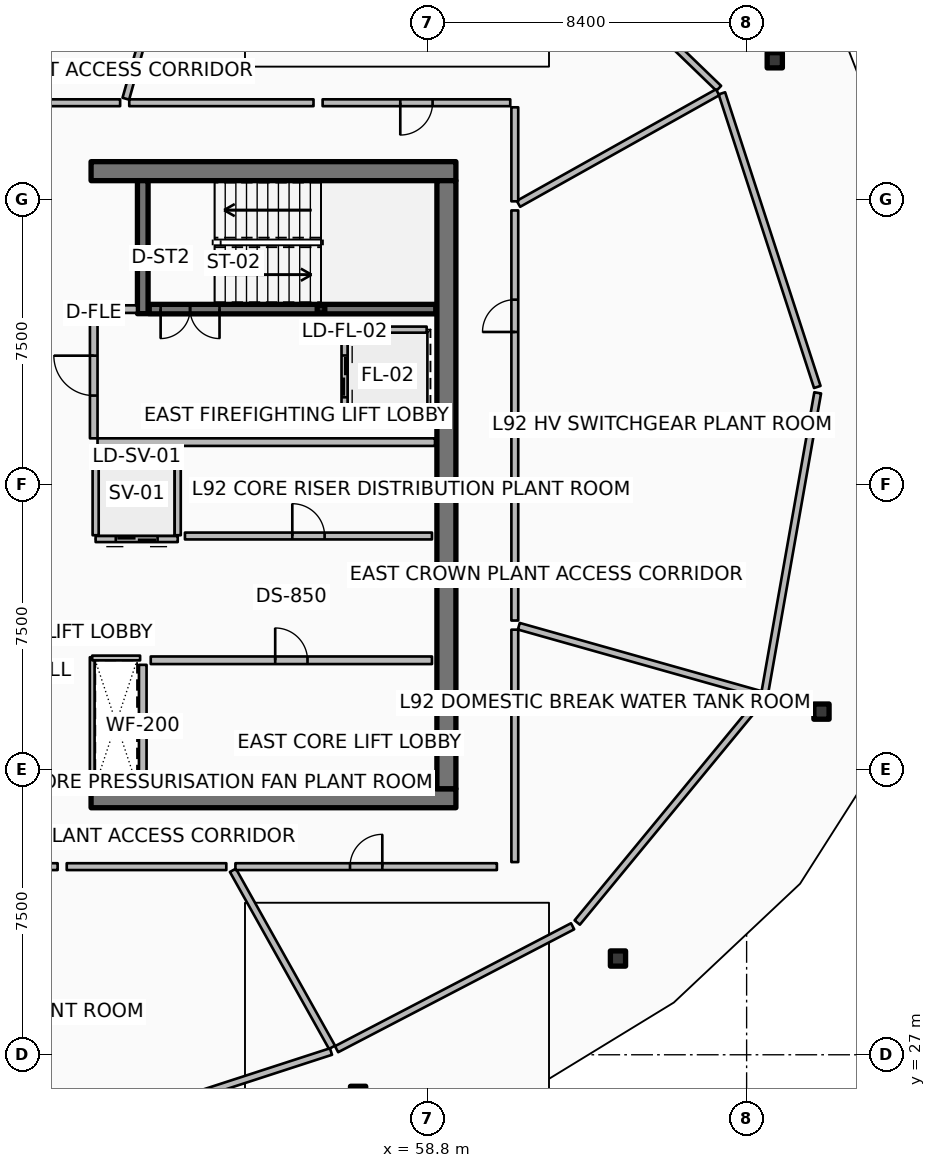
"""IFC4 building model, lengths in metres.
Left out: names, types, materials, properties, quantities, classifications, styles, units other than length and angle.
Written with IfcOpenShell. Run it as: python <this file> out.ifc"""

import sys

from ifc_helpers import new_model, si_unit, direction, frame, frame_2d, origin, origin_2d, place, context, subcontext, project, spatial, rectangle, hollow_rectangle, extrude, element, fill, save


model = new_model("IFC4")
c1 = context("Model", 3, precision=1e-05, world=origin(), true_north=direction((0.0, 1.0)))
c2 = subcontext(c1, "Body", "Model", "MODEL_VIEW")
j1 = project(units=[si_unit("LENGTHUNIT", "METRE"), si_unit("PLANEANGLEUNIT", "RADIAN")], contexts=[c1])
p1 = place(None, origin())
s1 = spatial("IfcSite", under=j1, at=p1, CompositionType="ELEMENT")
p2 = place(p1, origin())
s2 = spatial("IfcBuilding", under=s1, at=p2, CompositionType="ELEMENT")
p3 = place(p2, frame((0.0, 0.0, 366.8)))
s3 = spatial("IfcBuildingStorey", under=s2, at=p3, CompositionType="ELEMENT", Elevation=366.8)
for number, where, z_axis, x_axis in (
    (1, (49.95, 33.75, 0.0), (0.0, 0.0, 1.0), (1.0, 0.0, 0.0)),
    (2, (49.95, 50.25, 0.0), (0.0, 0.0, 1.0), (1.0, 0.0, 0.0)),
):
    element("IfcWall", number, at=place(p3, frame(where, z_axis=z_axis, x_axis=x_axis)), inside=s3, PredefinedType="SHEAR", context=c2, shape_type="SweptSolid", body=[
        extrude(rectangle(XDim=9.6, YDim=0.5, at=frame_2d((4.8, 0.0))), origin(), (0.0, 0.0, 1.0), 3.6),
    ])
p4 = place(p3, frame((59.3, 34.0, 0.0), z_axis=(0.0, 0.0, 1.0), x_axis=(0.0, 1.0, 0.0)))
e3 = element("IfcWall", 3, at=p4, inside=s3, PredefinedType="SHEAR", context=c2, shape_type="SweptSolid", body=[
    extrude(rectangle(XDim=16.0, YDim=0.5, at=frame_2d((8.0, 0.0))), origin(), (0.0, 0.0, 1.0), 3.6),
])
p5 = place(p3, frame((51.31, 46.5, 0.0), z_axis=(0.0, 0.0, 1.0), x_axis=(0.0, 1.0, 0.0)))
e4 = element("IfcWall", 4, at=p5, inside=s3, PredefinedType="SHEAR", context=c2, shape_type="SweptSolid", body=[
    extrude(rectangle(XDim=3.5, YDim=0.28, at=frame_2d((1.75, 0.0))), origin(), (0.0, 0.0, 1.0), 3.6),
])
p6 = place(p3, frame((56.0, 46.62, 0.0), z_axis=(0.0, 0.0, 1.0), x_axis=(1.0, 0.0, 0.0)))
e5 = element("IfcColumn", 5, at=p6, inside=s3, PredefinedType="COLUMN", context=c2, shape_type="SweptSolid", body=[
    extrude(hollow_rectangle(XDim=0.2, YDim=0.2, WallThickness=0.01, InnerFilletRadius=0.01, OuterFilletRadius=0.02, at=origin_2d()), origin(), (0.0, 0.0, 1.0), 1.595),
])
for number, where, z_axis, x_axis in (
    (6, (67.941, 53.167, 0.0), (0.0, 0.0, 1.0), (1.0, 0.0, 0.0)),
    (7, (56.977, 25.971, 0.0), (0.0, 0.0, 1.0), (1.0, 0.0, 0.0)),
    (8, (63.815, 29.532, 0.0), (0.0, 0.0, 1.0), (1.0, 0.0, 0.0)),
    (9, (69.17, 36.03, 0.0), (0.0, 0.0, 1.0), (1.0, 0.0, 0.0)),
):
    element("IfcColumn", number, at=place(p3, frame(where, z_axis=z_axis, x_axis=x_axis)), inside=s3, PredefinedType="COLUMN", context=c2, shape_type="SweptSolid", body=[
        extrude(hollow_rectangle(XDim=0.4, YDim=0.4, WallThickness=0.02, InnerFilletRadius=0.02, OuterFilletRadius=0.04, at=origin_2d()), origin(), (0.0, 0.0, 1.0), 3.32),
    ])
p7 = place(p3, frame((51.48, 46.62, 0.0), z_axis=(0.0, 0.0, 1.0), x_axis=(1.0, 0.0, 0.0)))
e10 = element("IfcWall", 10, at=p7, inside=s3, PredefinedType="SOLIDWALL", context=c2, shape_type="SweptSolid", body=[
    extrude(rectangle(XDim=7.54, YDim=0.25, at=frame_2d((3.77, 0.0))), origin(), (0.0, 0.0, 1.0), 3.32),
])
p8 = place(p7, frame((0.3, 0.0, 0.0)))
e11 = element("IfcOpeningElement", 11, at=p8, cuts=e10, PredefinedType="OPENING", context=c2, shape_type="SweptSolid", body=[
    extrude(rectangle(XDim=1.55, YDim=2.15, at=frame_2d((0.775, 1.075))), frame((0.0, 0.135, 0.0), z_axis=(0.0, -1.0, 0.0), x_axis=(1.0, 0.0, 0.0)), (0.0, 0.0, 1.0), 0.27),
])
p9 = place(p3, frame((51.52, 37.38, 0.0), z_axis=(0.0, 0.0, 1.0), x_axis=(1.0, 0.0, 0.0)))
e12 = element("IfcWall", 12, at=p9, inside=s3, PredefinedType="PARTITIONING", context=c2, shape_type="SweptSolid", body=[
    extrude(rectangle(XDim=7.4, YDim=0.2, at=frame_2d((3.7, 0.0))), origin(), (0.0, 0.0, 1.0), 3.32),
])
p10 = place(p9, frame((3.275, 0.0, 0.0)))
e13 = element("IfcOpeningElement", 13, at=p10, cuts=e12, PredefinedType="OPENING", context=c2, shape_type="SweptSolid", body=[
    extrude(rectangle(XDim=0.85, YDim=2.06, at=frame_2d((0.425, 1.03))), frame((0.0, 0.11, 0.0), z_axis=(0.0, -1.0, 0.0), x_axis=(1.0, 0.0, 0.0)), (0.0, 0.0, 1.0), 0.22),
])
p11 = place(p3, frame((51.31, 34.05, 0.0), z_axis=(0.0, 0.0, 1.0), x_axis=(0.0, 1.0, 0.0)))
e14 = element("IfcWall", 14, at=p11, inside=s3, PredefinedType="PARTITIONING", context=c2, shape_type="SweptSolid", body=[
    extrude(rectangle(XDim=3.21, YDim=0.2, at=frame_2d((1.605, 0.0))), origin(), (0.0, 0.0, 1.0), 3.32),
])
p12 = place(p3, frame((56.62, 46.08, 0.0), z_axis=(0.0, 0.0, 1.0), x_axis=(0.0, -1.0, 0.0)))
e15 = element("IfcWall", 15, at=p12, inside=s3, PredefinedType="PARTITIONING", context=c2, shape_type="SweptSolid", body=[
    extrude(rectangle(XDim=2.46, YDim=0.16, at=frame_2d((1.23, 0.0))), origin(), (0.0, 0.0, 1.0), 3.32),
])
p13 = place(p12, frame((0.68, 0.0, 0.0)))
e16 = element("IfcOpeningElement", 16, at=p13, cuts=e15, PredefinedType="OPENING", context=c2, shape_type="SweptSolid", body=[
    extrude(rectangle(XDim=1.1, YDim=2.1, at=frame_2d((0.55, 1.05))), frame((0.0, 0.09, 0.0), z_axis=(0.0, -1.0, 0.0), x_axis=(1.0, 0.0, 0.0)), (0.0, 0.0, 1.0), 0.18),
])
for number, where, z_axis, x_axis in (
    (17, (56.72, 46.08, 0.0), (0.0, 0.0, 1.0), (1.0, 0.0, 0.0)),
    (18, (56.72, 43.62, 0.0), (0.0, 0.0, 1.0), (1.0, 0.0, 0.0)),
):
    element("IfcWall", number, at=place(p3, frame(where, z_axis=z_axis, x_axis=x_axis)), inside=s3, PredefinedType="PARTITIONING", context=c2, shape_type="SweptSolid", body=[
        extrude(rectangle(XDim=2.06, YDim=0.16, at=frame_2d((1.03, 0.0))), origin(), (0.0, 0.0, 1.0), 3.32),
    ])
p14 = place(p3, frame((52.23, 40.57, 0.0), z_axis=(0.0, 0.0, 1.0), x_axis=(-1.0, 0.0, 0.0)))
e19 = element("IfcWall", 19, at=p14, inside=s3, PredefinedType="PARTITIONING", context=c2, shape_type="SweptSolid", body=[
    extrude(rectangle(XDim=2.16, YDim=0.16, at=frame_2d((1.08, 0.0))), origin(), (0.0, 0.0, 1.0), 3.32),
])
p15 = place(p14, frame((0.53, 0.0, 0.0)))
e20 = element("IfcOpeningElement", 20, at=p15, cuts=e19, PredefinedType="OPENING", context=c2, shape_type="SweptSolid", body=[
    extrude(rectangle(XDim=1.1, YDim=2.1, at=frame_2d((0.55, 1.05))), frame((0.0, 0.09, 0.0), z_axis=(0.0, -1.0, 0.0), x_axis=(1.0, 0.0, 0.0)), (0.0, 0.0, 1.0), 0.18),
])
for number, where, z_axis, x_axis in (
    (21, (52.23, 40.67, 0.0), (0.0, 0.0, 1.0), (0.0, 1.0, 0.0)),
    (22, (50.07, 40.67, 0.0), (0.0, 0.0, 1.0), (0.0, 1.0, 0.0)),
):
    element("IfcWall", number, at=place(p3, frame(where, z_axis=z_axis, x_axis=x_axis)), inside=s3, PredefinedType="PARTITIONING", context=c2, shape_type="SweptSolid", body=[
        extrude(rectangle(XDim=2.16, YDim=0.16, at=frame_2d((1.08, 0.0))), origin(), (0.0, 0.0, 1.0), 3.32),
    ])
p16 = place(p3, frame((50.17, 42.93, 0.0), z_axis=(0.0, 0.0, 1.0), x_axis=(1.0, 0.0, 0.0)))
e23 = element("IfcWall", 23, at=p16, inside=s3, PredefinedType="PARTITIONING", context=c2, shape_type="SweptSolid", body=[
    extrude(rectangle(XDim=1.96, YDim=0.16, at=frame_2d((0.98, 0.0))), origin(), (0.0, 0.0, 1.0), 3.32),
])
p17 = place(p3, frame((52.42, 40.65, 0.0), z_axis=(0.0, 0.0, 1.0), x_axis=(1.0, 0.0, 0.0)))
e24 = element("IfcWall", 24, at=p17, inside=s3, PredefinedType="PARTITIONING", context=c2, shape_type="SweptSolid", body=[
    extrude(rectangle(XDim=6.5, YDim=0.18, at=frame_2d((3.25, 0.0))), origin(), (0.0, 0.0, 1.0), 3.32),
])
p18 = place(p17, frame((2.825, 0.0, 0.0)))
e25 = element("IfcOpeningElement", 25, at=p18, cuts=e24, PredefinedType="OPENING", context=c2, shape_type="SweptSolid", body=[
    extrude(rectangle(XDim=0.85, YDim=2.06, at=frame_2d((0.425, 1.03))), frame((0.0, 0.1, 0.0), z_axis=(0.0, -1.0, 0.0), x_axis=(1.0, 0.0, 0.0)), (0.0, 0.0, 1.0), 0.2),
])
p19 = place(p3, frame((50.12, 43.12, 0.0), z_axis=(0.0, 0.0, 1.0), x_axis=(1.0, 0.0, 0.0)))
e26 = element("IfcWall", 26, at=p19, inside=s3, PredefinedType="PARTITIONING", context=c2, shape_type="SweptSolid", body=[
    extrude(rectangle(XDim=8.88, YDim=0.2, at=frame_2d((4.44, 0.0))), origin(), (0.0, 0.0, 1.0), 3.32),
])
p20 = place(p3, frame((50.14, 46.62, 0.0), z_axis=(0.0, 0.0, 1.0), x_axis=(1.0, 0.0, 0.0)))
e27 = element("IfcWall", 27, at=p20, inside=s3, PredefinedType="PARTITIONING", context=c2, shape_type="SweptSolid", body=[
    extrude(rectangle(XDim=1.02, YDim=0.2, at=frame_2d((0.51, 0.0))), origin(), (0.0, 0.0, 1.0), 3.32),
])
p21 = place(p3, frame((50.02, 43.22, 0.0), z_axis=(0.0, 0.0, 1.0), x_axis=(0.0, 1.0, 0.0)))
e28 = element("IfcWall", 28, at=p21, inside=s3, PredefinedType="PARTITIONING", context=c2, shape_type="SweptSolid", body=[
    extrude(rectangle(XDim=3.3, YDim=0.2, at=frame_2d((1.65, 0.0))), origin(), (0.0, 0.0, 1.0), 3.32),
])
p22 = place(p21, frame((1.125, 0.0, 0.0)))
e29 = element("IfcOpeningElement", 29, at=p22, cuts=e28, PredefinedType="OPENING", context=c2, shape_type="SweptSolid", body=[
    extrude(rectangle(XDim=1.05, YDim=2.1, at=frame_2d((0.525, 1.05))), frame((0.0, 0.11, 0.0), z_axis=(0.0, -1.0, 0.0), x_axis=(1.0, 0.0, 0.0)), (0.0, 0.0, 1.0), 0.22),
])
p23 = place(p3, frame((49.98, 34.06, 0.0), z_axis=(0.0, 0.0, 1.0), x_axis=(0.0, 1.0, 0.0)))
e30 = element("IfcWall", 30, at=p23, inside=s3, PredefinedType="PARTITIONING", context=c2, shape_type="SweptSolid", body=[
    extrude(rectangle(XDim=3.4, YDim=0.125, at=frame_2d((1.7, 0.0))), origin(), (0.0, 0.0, 1.0), 2.76),
])
p24 = place(p3, frame((49.98, 37.44, 0.0), z_axis=(0.0, 0.0, 1.0), x_axis=(1.0, 0.0, 0.0)))
e31 = element("IfcWall", 31, at=p24, inside=s3, PredefinedType="PARTITIONING", context=c2, shape_type="SweptSolid", body=[
    extrude(rectangle(XDim=1.26, YDim=0.125, at=frame_2d((0.63, 0.0))), origin(), (0.0, 0.0, 1.0), 2.76),
])
p25 = place(p3, frame((66.467, 52.43, 0.0), z_axis=(0.0, 0.0, 1.0), x_axis=(-0.719364153135, 0.694633151516, 0.0)))
e32 = element("IfcWall", 32, at=p25, inside=s3, PredefinedType="PARTITIONING", context=c2, shape_type="SweptSolid", body=[
    extrude(rectangle(XDim=8.006, YDim=0.18, at=frame_2d((4.003, 0.0))), origin(), (0.0, 0.0, 1.0), 2.76),
])
p26 = place(p3, frame((50.082, 25.077, 0.0), z_axis=(0.0, 0.0, 1.0), x_axis=(0.95105283999, 0.309028308649, 0.0)))
e33 = element("IfcWall", 33, at=p26, inside=s3, PredefinedType="PARTITIONING", context=c2, shape_type="SweptSolid", body=[
    extrude(rectangle(XDim=6.499, YDim=0.18, at=frame_2d((3.25, 0.0))), origin(), (0.0, 0.0, 1.0), 2.76),
])
p27 = place(p3, frame((56.41, 27.147, 0.0), z_axis=(0.0, 0.0, 1.0), x_axis=(0.886949494865, 0.461866423935, 0.0)))
e34 = element("IfcWall", 34, at=p27, inside=s3, PredefinedType="PARTITIONING", context=c2, shape_type="SweptSolid", body=[
    extrude(rectangle(XDim=7.002, YDim=0.18, at=frame_2d((3.501, 0.0))), origin(), (0.0, 0.0, 1.0), 2.76),
])
p28 = place(p3, frame((62.742, 30.48, 0.0), z_axis=(0.0, 0.0, 1.0), x_axis=(0.636018833443, 0.771673534278, 0.0)))
e35 = element("IfcWall", 35, at=p28, inside=s3, PredefinedType="PARTITIONING", context=c2, shape_type="SweptSolid", body=[
    extrude(rectangle(XDim=7.661, YDim=0.18, at=frame_2d((3.831, 0.0))), origin(), (0.0, 0.0, 1.0), 2.76),
])
p29 = place(p3, frame((67.68, 36.532, 0.0), z_axis=(0.0, 0.0, 1.0), x_axis=(0.173668776466, 0.984804120666, 0.0)))
e36 = element("IfcWall", 36, at=p29, inside=s3, PredefinedType="PARTITIONING", context=c2, shape_type="SweptSolid", body=[
    extrude(rectangle(XDim=8.006, YDim=0.18, at=frame_2d((4.003, 0.0))), origin(), (0.0, 0.0, 1.0), 2.76),
])
p30 = place(p3, frame((69.059, 44.572, 0.0), z_axis=(0.0, 0.0, 1.0), x_axis=(-0.309024234991, 0.951054163646, 0.0)))
e37 = element("IfcWall", 37, at=p30, inside=s3, PredefinedType="PARTITIONING", context=c2, shape_type="SweptSolid", body=[
    extrude(rectangle(XDim=8.124, YDim=0.18, at=frame_2d((4.062, 0.0))), origin(), (0.0, 0.0, 1.0), 2.76),
])
p31 = place(p3, frame((50.714, 52.05, 0.0), z_axis=(0.0, 0.0, 1.0), x_axis=(-1.0, 0.0, 0.0)))
e38 = element("IfcWall", 38, at=p31, inside=s3, PredefinedType="PARTITIONING", context=c2, shape_type="SweptSolid", body=[
    extrude(rectangle(XDim=3.784, YDim=0.18, at=frame_2d((1.892, 0.0))), origin(), (0.0, 0.0, 1.0), 2.76),
])
p32 = place(p3, frame((50.864, 52.156, 0.0), z_axis=(0.0, 0.0, 1.0), x_axis=(0.271457285698, 0.962450488099, 0.0)))
e39 = element("IfcWall", 39, at=p32, inside=s3, PredefinedType="PARTITIONING", context=c2, shape_type="SweptSolid", body=[
    extrude(rectangle(XDim=8.056, YDim=0.18, at=frame_2d((4.028, 0.0))), origin(), (0.0, 0.0, 1.0), 2.76),
])
p33 = place(p3, frame((45.286, 31.95, 0.0), z_axis=(0.0, 0.0, 1.0), x_axis=(1.0, 0.0, 0.0)))
e40 = element("IfcWall", 40, at=p33, inside=s3, PredefinedType="PARTITIONING", context=c2, shape_type="SweptSolid", body=[
    extrude(rectangle(XDim=3.784, YDim=0.18, at=frame_2d((1.892, 0.0))), origin(), (0.0, 0.0, 1.0), 2.76),
])
p34 = place(p3, frame((49.31, 31.95, 0.0), z_axis=(0.0, 0.0, 1.0), x_axis=(1.0, 0.0, 0.0)))
e41 = element("IfcWall", 41, at=p34, inside=s3, PredefinedType="PARTITIONING", context=c2, shape_type="SweptSolid", body=[
    extrude(rectangle(XDim=4.199, YDim=0.18, at=frame_2d((2.099, 0.0))), origin(), (0.0, 0.0, 1.0), 2.76),
])
p35 = place(p3, frame((53.682, 31.854, 0.0), z_axis=(0.0, 0.0, 1.0), x_axis=(0.488622869326, -0.872495095443, 0.0)))
e42 = element("IfcWall", 42, at=p35, inside=s3, PredefinedType="PARTITIONING", context=c2, shape_type="SweptSolid", body=[
    extrude(rectangle(XDim=5.337, YDim=0.18, at=frame_2d((2.668, 0.0))), origin(), (0.0, 0.0, 1.0), 2.76),
])
p36 = place(p3, frame((53.748, 31.95, 0.0), z_axis=(0.0, 0.0, 1.0), x_axis=(1.0, 0.0, 0.0)))
e43 = element("IfcWall", 43, at=p36, inside=s3, PredefinedType="PARTITIONING", context=c2, shape_type="SweptSolid", body=[
    extrude(rectangle(XDim=6.88, YDim=0.18, at=frame_2d((3.44, 0.0))), origin(), (0.0, 0.0, 1.0), 2.76),
])
p37 = place(p36, frame((3.015, 0.0, 0.0)))
e44 = element("IfcOpeningElement", 44, at=p37, cuts=e43, PredefinedType="OPENING", context=c2, shape_type="SweptSolid", body=[
    extrude(rectangle(XDim=0.85, YDim=2.06, at=frame_2d((0.425, 1.03))), frame((0.0, 0.1, 0.0), z_axis=(0.0, -1.0, 0.0), x_axis=(1.0, 0.0, 0.0)), (0.0, 0.0, 1.0), 0.2),
])
p38 = place(p3, frame((61.1, 32.07, 0.0), z_axis=(0.0, 0.0, 1.0), x_axis=(0.0, 1.0, 0.0)))
e45 = element("IfcWall", 45, at=p38, inside=s3, PredefinedType="PARTITIONING", context=c2, shape_type="SweptSolid", body=[
    extrude(rectangle(XDim=6.115, YDim=0.18, at=frame_2d((3.058, 0.0))), origin(), (0.0, 0.0, 1.0), 2.76),
])
p39 = place(p3, frame((61.206, 38.275, 0.0), z_axis=(0.0, 0.0, 1.0), x_axis=(0.962461547865, -0.271418070294, 0.0)))
e46 = element("IfcWall", 46, at=p39, inside=s3, PredefinedType="PARTITIONING", context=c2, shape_type="SweptSolid", body=[
    extrude(rectangle(XDim=6.612, YDim=0.18, at=frame_2d((3.306, 0.0))), origin(), (0.0, 0.0, 1.0), 2.76),
])
p40 = place(p3, frame((61.1, 38.425, 0.0), z_axis=(0.0, 0.0, 1.0), x_axis=(0.0, 1.0, 0.0)))
e47 = element("IfcWall", 47, at=p40, inside=s3, PredefinedType="PARTITIONING", context=c2, shape_type="SweptSolid", body=[
    extrude(rectangle(XDim=5.005, YDim=0.18, at=frame_2d((2.502, 0.0))), origin(), (0.0, 0.0, 1.0), 2.76),
])
p41 = place(p3, frame((61.1, 43.67, 0.0), z_axis=(0.0, 0.0, 1.0), x_axis=(0.0, 1.0, 0.0)))
e48 = element("IfcWall", 48, at=p41, inside=s3, PredefinedType="PARTITIONING", context=c2, shape_type="SweptSolid", body=[
    extrude(rectangle(XDim=5.546, YDim=0.18, at=frame_2d((2.773, 0.0))), origin(), (0.0, 0.0, 1.0), 2.76),
])
p42 = place(p41, frame((2.348, 0.0, 0.0)))
e49 = element("IfcOpeningElement", 49, at=p42, cuts=e48, PredefinedType="OPENING", context=c2, shape_type="SweptSolid", body=[
    extrude(rectangle(XDim=0.85, YDim=2.06, at=frame_2d((0.425, 1.03))), frame((0.0, 0.1, 0.0), z_axis=(0.0, -1.0, 0.0), x_axis=(1.0, 0.0, 0.0)), (0.0, 0.0, 1.0), 0.2),
])
p43 = place(p3, frame((61.196, 49.39, 0.0), z_axis=(0.0, 0.0, 1.0), x_axis=(0.87249769897, 0.488618220385, 0.0)))
e50 = element("IfcWall", 50, at=p43, inside=s3, PredefinedType="PARTITIONING", context=c2, shape_type="SweptSolid", body=[
    extrude(rectangle(XDim=6.007, YDim=0.18, at=frame_2d((3.003, 0.0))), origin(), (0.0, 0.0, 1.0), 2.76),
])
p44 = place(p3, frame((61.1, 49.456, 0.0), z_axis=(0.0, 0.0, 1.0), x_axis=(0.0, 1.0, 0.0)))
e51 = element("IfcWall", 51, at=p44, inside=s3, PredefinedType="PARTITIONING", context=c2, shape_type="SweptSolid", body=[
    extrude(rectangle(XDim=2.474, YDim=0.18, at=frame_2d((1.237, 0.0))), origin(), (0.0, 0.0, 1.0), 2.76),
])
p45 = place(p3, frame((60.98, 52.05, 0.0), z_axis=(0.0, 0.0, 1.0), x_axis=(-1.0, 0.0, 0.0)))
e52 = element("IfcWall", 52, at=p45, inside=s3, PredefinedType="PARTITIONING", context=c2, shape_type="SweptSolid", body=[
    extrude(rectangle(XDim=4.937, YDim=0.18, at=frame_2d((2.469, 0.0))), origin(), (0.0, 0.0, 1.0), 2.76),
])
p46 = place(p45, frame((2.044, 0.0, 0.0)))
e53 = element("IfcOpeningElement", 53, at=p46, cuts=e52, PredefinedType="OPENING", context=c2, shape_type="SweptSolid", body=[
    extrude(rectangle(XDim=0.85, YDim=2.06, at=frame_2d((0.425, 1.03))), frame((0.0, 0.1, 0.0), z_axis=(0.0, -1.0, 0.0), x_axis=(1.0, 0.0, 0.0)), (0.0, 0.0, 1.0), 0.2),
])
p47 = place(p3, frame((55.803, 52.05, 0.0), z_axis=(0.0, 0.0, 1.0), x_axis=(-1.0, 0.0, 0.0)))
e54 = element("IfcWall", 54, at=p47, inside=s3, PredefinedType="PARTITIONING", context=c2, shape_type="SweptSolid", body=[
    extrude(rectangle(XDim=4.848, YDim=0.18, at=frame_2d((2.424, 0.0))), origin(), (0.0, 0.0, 1.0), 2.76),
])
p48 = place(p8, origin())
e55 = element("IfcDoor", 55, at=p48, inside=s3, OperationType="DOUBLE_DOOR_SINGLE_SWING", PredefinedType="DOOR", context=c2, shape_type="SweptSolid", body=[
    extrude(rectangle(XDim=1.55, YDim=2.15, at=frame_2d((0.775, 1.075))), frame((0.0, 0.025, 0.0), z_axis=(0.0, -1.0, 0.0), x_axis=(1.0, 0.0, 0.0)), (0.0, 0.0, 1.0), 0.05),
])
fill(e11, e55)
p49 = place(p10, origin())
e56 = element("IfcDoor", 56, at=p49, inside=s3, OperationType="SINGLE_SWING_LEFT", PredefinedType="DOOR", context=c2, shape_type="SweptSolid", body=[
    extrude(rectangle(XDim=0.85, YDim=2.06, at=frame_2d((0.425, 1.03))), frame((0.0, 0.025, 0.0), z_axis=(0.0, -1.0, 0.0), x_axis=(1.0, 0.0, 0.0)), (0.0, 0.0, 1.0), 0.05),
])
fill(e13, e56)
p50 = place(p13, origin())
e57 = element("IfcDoor", 57, at=p50, inside=s3, OperationType="DOUBLE_DOOR_SLIDING", PredefinedType="DOOR", context=c2, shape_type="SweptSolid", body=[
    extrude(rectangle(XDim=1.1, YDim=2.1, at=frame_2d((0.55, 1.05))), frame((0.0, 0.025, 0.0), z_axis=(0.0, -1.0, 0.0), x_axis=(1.0, 0.0, 0.0)), (0.0, 0.0, 1.0), 0.05),
])
fill(e16, e57)
p51 = place(p15, origin())
e58 = element("IfcDoor", 58, at=p51, inside=s3, OperationType="DOUBLE_DOOR_SLIDING", PredefinedType="DOOR", context=c2, shape_type="SweptSolid", body=[
    extrude(rectangle(XDim=1.1, YDim=2.1, at=frame_2d((0.55, 1.05))), frame((0.0, 0.025, 0.0), z_axis=(0.0, -1.0, 0.0), x_axis=(1.0, 0.0, 0.0)), (0.0, 0.0, 1.0), 0.05),
])
fill(e20, e58)
p52 = place(p18, origin())
e59 = element("IfcDoor", 59, at=p52, inside=s3, OperationType="SINGLE_SWING_LEFT", PredefinedType="DOOR", context=c2, shape_type="SweptSolid", body=[
    extrude(rectangle(XDim=0.85, YDim=2.06, at=frame_2d((0.425, 1.03))), frame((0.0, 0.025, 0.0), z_axis=(0.0, -1.0, 0.0), x_axis=(1.0, 0.0, 0.0)), (0.0, 0.0, 1.0), 0.05),
])
fill(e25, e59)
p53 = place(p22, origin())
e60 = element("IfcDoor", 60, at=p53, inside=s3, OperationType="SINGLE_SWING_RIGHT", PredefinedType="DOOR", context=c2, shape_type="SweptSolid", body=[
    extrude(rectangle(XDim=1.05, YDim=2.1, at=frame_2d((0.525, 1.05))), frame((0.0, 0.025, 0.0), z_axis=(0.0, -1.0, 0.0), x_axis=(1.0, 0.0, 0.0)), (0.0, 0.0, 1.0), 0.05),
])
fill(e29, e60)
p54 = place(p37, origin())
e61 = element("IfcDoor", 61, at=p54, inside=s3, OperationType="SINGLE_SWING_RIGHT", PredefinedType="DOOR", context=c2, shape_type="SweptSolid", body=[
    extrude(rectangle(XDim=0.85, YDim=2.06, at=frame_2d((0.425, 1.03))), frame((0.0, 0.025, 0.0), z_axis=(0.0, -1.0, 0.0), x_axis=(1.0, 0.0, 0.0)), (0.0, 0.0, 1.0), 0.05),
])
fill(e44, e61)
p55 = place(p42, origin())
e62 = element("IfcDoor", 62, at=p55, inside=s3, OperationType="SINGLE_SWING_LEFT", PredefinedType="DOOR", context=c2, shape_type="SweptSolid", body=[
    extrude(rectangle(XDim=0.85, YDim=2.06, at=frame_2d((0.425, 1.03))), frame((0.0, 0.025, 0.0), z_axis=(0.0, -1.0, 0.0), x_axis=(1.0, 0.0, 0.0)), (0.0, 0.0, 1.0), 0.05),
])
fill(e49, e62)
p56 = place(p46, origin())
e63 = element("IfcDoor", 63, at=p56, inside=s3, OperationType="SINGLE_SWING_RIGHT", PredefinedType="DOOR", context=c2, shape_type="SweptSolid", body=[
    extrude(rectangle(XDim=0.85, YDim=2.06, at=frame_2d((0.425, 1.03))), frame((0.0, 0.025, 0.0), z_axis=(0.0, -1.0, 0.0), x_axis=(1.0, 0.0, 0.0)), (0.0, 0.0, 1.0), 0.05),
])
fill(e53, e63)
save(model, sys.argv[1])
